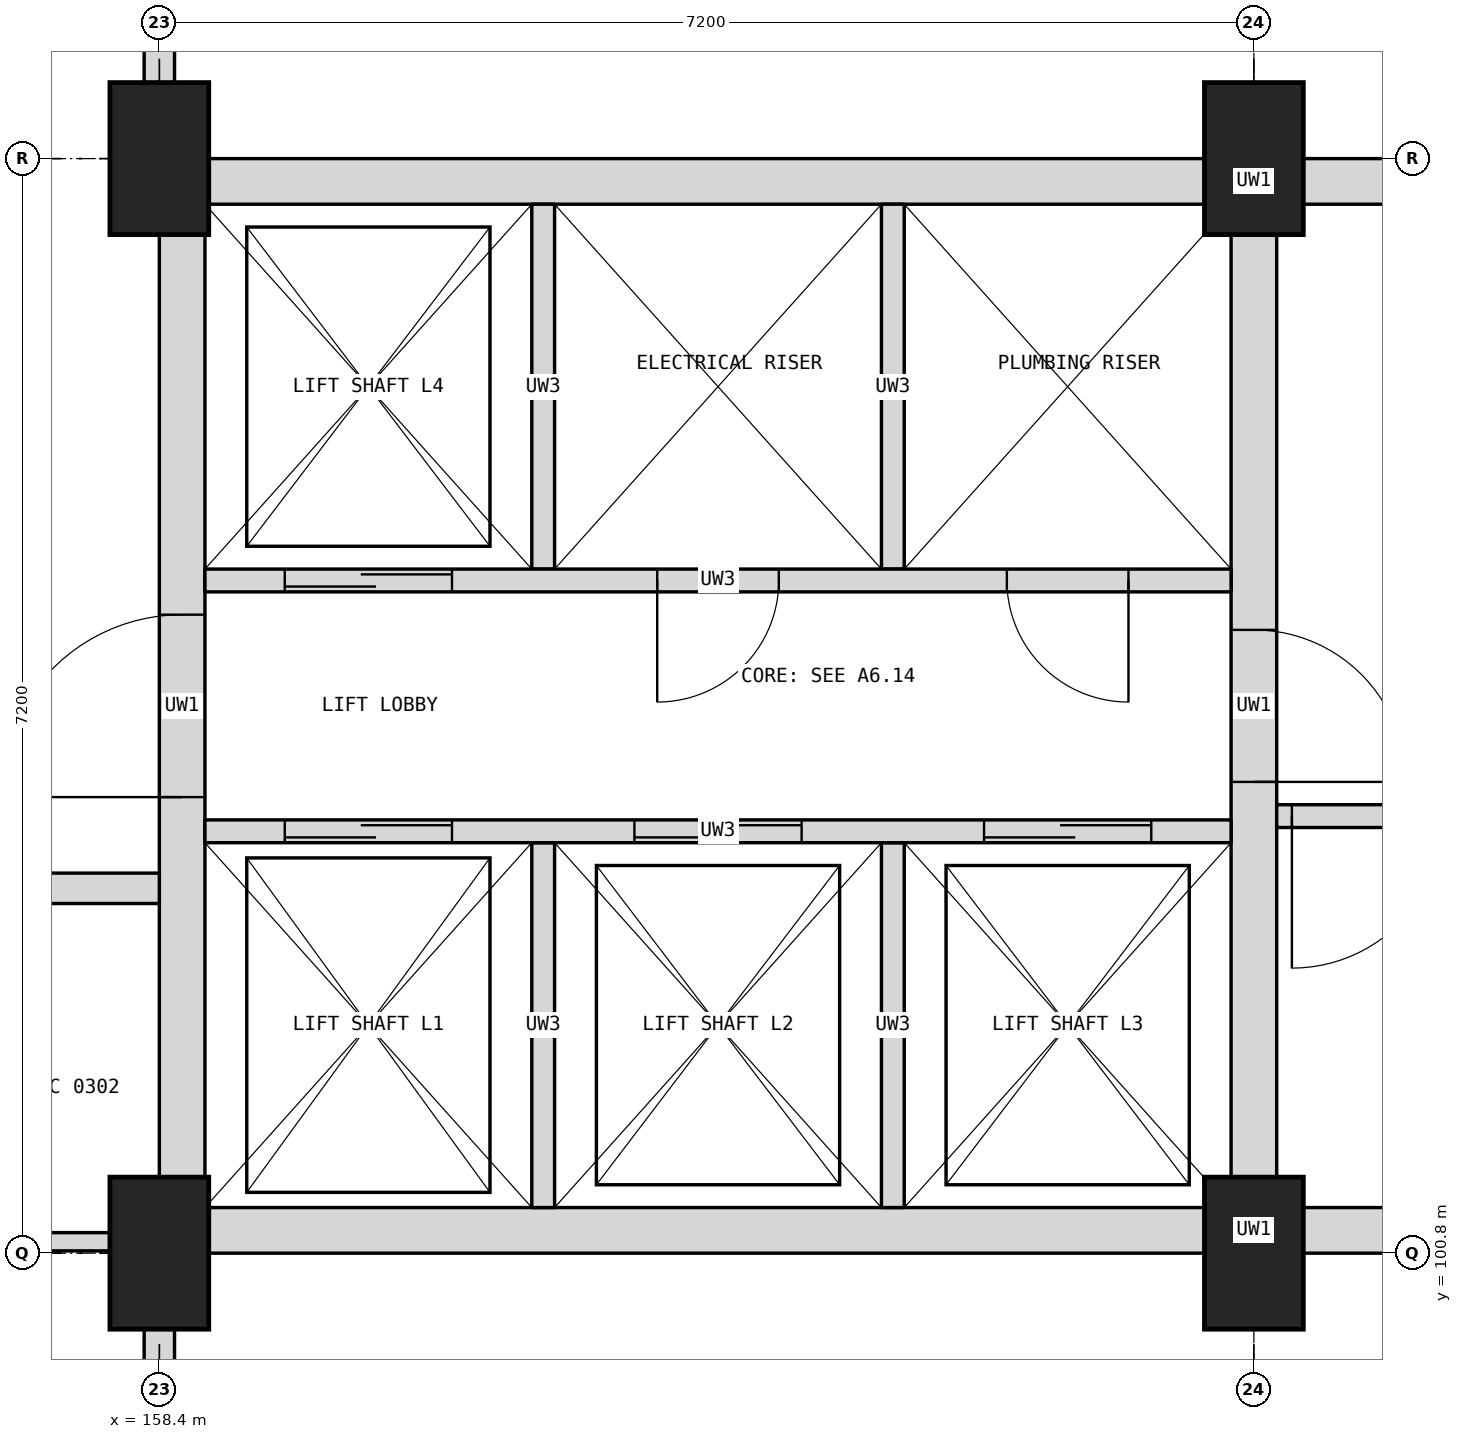
"""IFC4 building model, lengths in metres.
Left out: names, types, materials, properties, quantities, classifications, styles, units other than length and angle.
Written with IfcOpenShell. Run it as: python <this file> out.ifc"""

import sys

from ifc_helpers import new_model, si_unit, direction, frame, frame_2d, origin, origin_2d, place, context, subcontext, project, spatial, rectangle, extrude, element, fill, save


model = new_model("IFC4")
c1 = context("Model", 3, precision=1e-05, world=origin(), true_north=direction((0.0, 1.0)))
c2 = subcontext(c1, "Body", "Model", "MODEL_VIEW")
j1 = project(units=[si_unit("LENGTHUNIT", "METRE"), si_unit("PLANEANGLEUNIT", "RADIAN")], contexts=[c1])
p1 = place(None, origin())
s1 = spatial("IfcSite", under=j1, at=p1, CompositionType="ELEMENT")
p2 = place(p1, origin())
s2 = spatial("IfcBuilding", under=s1, at=p2, CompositionType="ELEMENT")
p3 = place(p2, frame((0.0, 0.0, 16.5)))
s3 = spatial("IfcBuildingStorey", under=s2, at=p3, CompositionType="ELEMENT", Elevation=16.5)
for number, where, z_axis, x_axis in (
    (1, (158.4, 100.8, 0.0), (0.0, 0.0, 1.0), (1.0, 0.0, 0.0)),
    (2, (158.4, 108.0, 0.0), (0.0, 0.0, 1.0), (1.0, 0.0, 0.0)),
    (3, (165.6, 100.8, 0.0), (0.0, 0.0, 1.0), (1.0, 0.0, 0.0)),
    (4, (165.6, 108.0, 0.0), (0.0, 0.0, 1.0), (1.0, 0.0, 0.0)),
):
    element("IfcColumn", number, at=place(p3, frame(where, z_axis=z_axis, x_axis=x_axis)), inside=s3, PredefinedType="COLUMN", context=c2, shape_type="SweptSolid", body=[
        extrude(rectangle(XDim=0.65, YDim=1.0, at=origin_2d()), origin(), (0.0, 0.0, 1.0), 3.4),
    ])
for number, where, z_axis, x_axis in (
    (5, (158.4, 100.95, 0.0), (0.0, 0.0, 1.0), (1.0, 0.0, 0.0)),
    (6, (158.4, 107.85, 0.0), (0.0, 0.0, 1.0), (1.0, 0.0, 0.0)),
):
    element("IfcWall", number, at=place(p3, frame(where, z_axis=z_axis, x_axis=x_axis)), inside=s3, PredefinedType="SHEAR", context=c2, shape_type="SweptSolid", body=[
        extrude(rectangle(XDim=14.4, YDim=0.3, at=frame_2d((7.2, 0.0))), origin(), (0.0, 0.0, 1.0), 3.4),
    ])
p4 = place(p3, frame((158.55, 101.1, 0.0), z_axis=(0.0, 0.0, 1.0), x_axis=(0.0, 1.0, 0.0)))
e7 = element("IfcWall", 7, at=p4, inside=s3, PredefinedType="SHEAR", context=c2, shape_type="SweptSolid", body=[
    extrude(rectangle(XDim=6.6, YDim=0.3, at=frame_2d((3.3, 0.0))), origin(), (0.0, 0.0, 1.0), 3.4),
])
p5 = place(p4, frame((2.7, 0.0, 0.0)))
e8 = element("IfcOpeningElement", 8, at=p5, cuts=e7, PredefinedType="OPENING", context=c2, shape_type="SweptSolid", body=[
    extrude(rectangle(XDim=1.2, YDim=2.1, at=frame_2d((0.6, 1.05))), frame((0.0, 0.16, 0.0), z_axis=(0.0, -1.0, 0.0), x_axis=(1.0, 0.0, 0.0)), (0.0, 0.0, 1.0), 0.32),
])
p6 = place(p3, frame((165.6, 101.1, 0.0), z_axis=(0.0, 0.0, 1.0), x_axis=(0.0, 1.0, 0.0)))
e9 = element("IfcWall", 9, at=p6, inside=s3, PredefinedType="SHEAR", context=c2, shape_type="SweptSolid", body=[
    extrude(rectangle(XDim=6.6, YDim=0.3, at=frame_2d((3.3, 0.0))), origin(), (0.0, 0.0, 1.0), 3.4),
])
p7 = place(p6, frame((2.8, 0.0, 0.0)))
e10 = element("IfcOpeningElement", 10, at=p7, cuts=e9, PredefinedType="OPENING", context=c2, shape_type="SweptSolid", body=[
    extrude(rectangle(XDim=1.0, YDim=2.1, at=frame_2d((0.5, 1.05))), frame((0.0, 0.16, 0.0), z_axis=(0.0, -1.0, 0.0), x_axis=(1.0, 0.0, 0.0)), (0.0, 0.0, 1.0), 0.32),
])
for number, where, z_axis, x_axis in (
    (11, (160.925, 101.1, 0.0), (0.0, 0.0, 1.0), (0.0, 1.0, 0.0)),
    (12, (163.225, 101.1, 0.0), (0.0, 0.0, 1.0), (0.0, 1.0, 0.0)),
    (13, (160.925, 105.3, 0.0), (0.0, 0.0, 1.0), (0.0, 1.0, 0.0)),
    (14, (163.225, 105.3, 0.0), (0.0, 0.0, 1.0), (0.0, 1.0, 0.0)),
):
    element("IfcWall", number, at=place(p3, frame(where, z_axis=z_axis, x_axis=x_axis)), inside=s3, PredefinedType="PARTITIONING", context=c2, shape_type="SweptSolid", body=[
        extrude(rectangle(XDim=2.4, YDim=0.15, at=frame_2d((1.2, 0.0))), origin(), (0.0, 0.0, 1.0), 3.4),
    ])
p8 = place(p3, frame((158.7, 103.575, 0.0), z_axis=(0.0, 0.0, 1.0), x_axis=(1.0, 0.0, 0.0)))
e15 = element("IfcWall", 15, at=p8, inside=s3, PredefinedType="PARTITIONING", context=c2, shape_type="SweptSolid", body=[
    extrude(rectangle(XDim=6.75, YDim=0.15, at=frame_2d((3.375, 0.0))), origin(), (0.0, 0.0, 1.0), 3.4),
])
p9 = place(p8, frame((0.525, 0.0, 0.0)))
e16 = element("IfcOpeningElement", 16, at=p9, cuts=e15, PredefinedType="OPENING", context=c2, shape_type="SweptSolid", body=[
    extrude(rectangle(XDim=1.1, YDim=2.1, at=frame_2d((0.55, 1.05))), frame((0.0, 0.085, 0.0), z_axis=(0.0, -1.0, 0.0), x_axis=(1.0, 0.0, 0.0)), (0.0, 0.0, 1.0), 0.17),
])
p10 = place(p8, frame((2.825, 0.0, 0.0)))
e17 = element("IfcOpeningElement", 17, at=p10, cuts=e15, PredefinedType="OPENING", context=c2, shape_type="SweptSolid", body=[
    extrude(rectangle(XDim=1.1, YDim=2.1, at=frame_2d((0.55, 1.05))), frame((0.0, 0.085, 0.0), z_axis=(0.0, -1.0, 0.0), x_axis=(1.0, 0.0, 0.0)), (0.0, 0.0, 1.0), 0.17),
])
p11 = place(p8, frame((5.125, 0.0, 0.0)))
e18 = element("IfcOpeningElement", 18, at=p11, cuts=e15, PredefinedType="OPENING", context=c2, shape_type="SweptSolid", body=[
    extrude(rectangle(XDim=1.1, YDim=2.1, at=frame_2d((0.55, 1.05))), frame((0.0, 0.085, 0.0), z_axis=(0.0, -1.0, 0.0), x_axis=(1.0, 0.0, 0.0)), (0.0, 0.0, 1.0), 0.17),
])
p12 = place(p3, frame((158.7, 105.225, 0.0), z_axis=(0.0, 0.0, 1.0), x_axis=(1.0, 0.0, 0.0)))
e19 = element("IfcWall", 19, at=p12, inside=s3, PredefinedType="PARTITIONING", context=c2, shape_type="SweptSolid", body=[
    extrude(rectangle(XDim=6.75, YDim=0.15, at=frame_2d((3.375, 0.0))), origin(), (0.0, 0.0, 1.0), 3.4),
])
p13 = place(p12, frame((0.525, 0.0, 0.0)))
e20 = element("IfcOpeningElement", 20, at=p13, cuts=e19, PredefinedType="OPENING", context=c2, shape_type="SweptSolid", body=[
    extrude(rectangle(XDim=1.1, YDim=2.1, at=frame_2d((0.55, 1.05))), frame((0.0, 0.085, 0.0), z_axis=(0.0, -1.0, 0.0), x_axis=(1.0, 0.0, 0.0)), (0.0, 0.0, 1.0), 0.17),
])
p14 = place(p12, frame((2.975, 0.0, 0.0)))
e21 = element("IfcOpeningElement", 21, at=p14, cuts=e19, PredefinedType="OPENING", context=c2, shape_type="SweptSolid", body=[
    extrude(rectangle(XDim=0.8, YDim=2.1, at=frame_2d((0.4, 1.05))), frame((0.0, 0.085, 0.0), z_axis=(0.0, -1.0, 0.0), x_axis=(1.0, 0.0, 0.0)), (0.0, 0.0, 1.0), 0.17),
])
p15 = place(p12, frame((5.275, 0.0, 0.0)))
e22 = element("IfcOpeningElement", 22, at=p15, cuts=e19, PredefinedType="OPENING", context=c2, shape_type="SweptSolid", body=[
    extrude(rectangle(XDim=0.8, YDim=2.1, at=frame_2d((0.4, 1.05))), frame((0.0, 0.085, 0.0), z_axis=(0.0, -1.0, 0.0), x_axis=(1.0, 0.0, 0.0)), (0.0, 0.0, 1.0), 0.17),
])
p16 = place(p3, frame((165.75, 103.675, 0.0), z_axis=(0.0, 0.0, 1.0), x_axis=(1.0, 0.0, 0.0)))
e23 = element("IfcWall", 23, at=p16, inside=s3, PredefinedType="SHEAR", context=c2, shape_type="SweptSolid", body=[
    extrude(rectangle(XDim=6.75, YDim=0.15, at=frame_2d((3.375, 0.0))), origin(), (0.0, 0.0, 1.0), 3.4),
])
p17 = place(p16, frame((0.1, 0.0, 0.0)))
e24 = element("IfcOpeningElement", 24, at=p17, cuts=e23, PredefinedType="OPENING", context=c2, shape_type="SweptSolid", body=[
    extrude(rectangle(XDim=1.0, YDim=2.1, at=frame_2d((0.5, 1.05))), frame((0.0, 0.085, 0.0), z_axis=(0.0, -1.0, 0.0), x_axis=(1.0, 0.0, 0.0)), (0.0, 0.0, 1.0), 0.17),
])
p18 = place(p3, frame((154.9, 100.875, 0.0), z_axis=(0.0, 0.0, 1.0), x_axis=(1.0, 0.0, 0.0)))
e25 = element("IfcWall", 25, at=p18, inside=s3, PredefinedType="PARTITIONING", context=c2, shape_type="SweptSolid", body=[
    extrude(rectangle(XDim=3.225, YDim=0.12, at=frame_2d((1.613, 0.0))), origin(), (0.0, 0.0, 1.0), 2.5),
])
p19 = place(p18, frame((1.325, 0.0, 0.0)))
e26 = element("IfcOpeningElement", 26, at=p19, cuts=e25, PredefinedType="OPENING", context=c2, shape_type="SweptSolid", body=[
    extrude(rectangle(XDim=0.75, YDim=2.1, at=frame_2d((0.375, 1.05))), frame((0.0, 0.07, 0.0), z_axis=(0.0, -1.0, 0.0), x_axis=(1.0, 0.0, 0.0)), (0.0, 0.0, 1.0), 0.14),
])
p20 = place(p3, frame((154.9, 103.2, 0.0), z_axis=(0.0, 0.0, 1.0), x_axis=(1.0, 0.0, 0.0)))
e27 = element("IfcWall", 27, at=p20, inside=s3, PredefinedType="PARTITIONING", context=c2, shape_type="SweptSolid", body=[
    extrude(rectangle(XDim=3.5, YDim=0.2, at=frame_2d((1.75, 0.0))), origin(), (0.0, 0.0, 1.0), 3.1),
])
p21 = place(p20, frame((1.25, 0.0, 0.0)))
e28 = element("IfcOpeningElement", 28, at=p21, cuts=e27, PredefinedType="OPENING", context=c2, shape_type="SweptSolid", body=[
    extrude(rectangle(XDim=0.9, YDim=2.1, at=frame_2d((0.45, 1.05))), frame((0.0, 0.11, 0.0), z_axis=(0.0, -1.0, 0.0), x_axis=(1.0, 0.0, 0.0)), (0.0, 0.0, 1.0), 0.22),
])
p22 = place(p3, frame((158.4, 94.0, 0.0), z_axis=(0.0, 0.0, 1.0), x_axis=(0.0, 1.0, 0.0)))
e29 = element("IfcWall", 29, at=p22, inside=s3, PredefinedType="PARTITIONING", context=c2, shape_type="SweptSolid", body=[
    extrude(rectangle(XDim=6.35, YDim=0.2, at=frame_2d((3.175, 0.0))), origin(), (0.0, 0.0, 1.0), 2.5),
])
p23 = place(p3, frame((158.4, 108.45, 0.0), z_axis=(0.0, 0.0, 1.0), x_axis=(0.0, 1.0, 0.0)))
e30 = element("IfcWall", 30, at=p23, inside=s3, PredefinedType="PARTITIONING", context=c2, shape_type="SweptSolid", body=[
    extrude(rectangle(XDim=6.35, YDim=0.2, at=frame_2d((3.175, 0.0))), origin(), (0.0, 0.0, 1.0), 2.5),
])
p24 = place(p23, frame((2.15, 0.0, 0.0)))
e31 = element("IfcOpeningElement", 31, at=p24, cuts=e30, PredefinedType="OPENING", context=c2, shape_type="SweptSolid", body=[
    extrude(rectangle(XDim=2.0, YDim=2.1, at=frame_2d((1.0, 1.05))), frame((0.0, 0.11, 0.0), z_axis=(0.0, -1.0, 0.0), x_axis=(1.0, 0.0, 0.0)), (0.0, 0.0, 1.0), 0.22),
])
p25 = place(p9, origin())
e32 = element("IfcDoor", 32, at=p25, inside=s3, OperationType="DOUBLE_DOOR_SLIDING", PredefinedType="DOOR", context=c2, shape_type="SweptSolid", body=[
    extrude(rectangle(XDim=1.1, YDim=2.1, at=frame_2d((0.55, 1.05))), frame((0.0, 0.025, 0.0), z_axis=(0.0, -1.0, 0.0), x_axis=(1.0, 0.0, 0.0)), (0.0, 0.0, 1.0), 0.05),
])
fill(e16, e32)
p26 = place(p10, origin())
e33 = element("IfcDoor", 33, at=p26, inside=s3, OperationType="DOUBLE_DOOR_SLIDING", PredefinedType="DOOR", context=c2, shape_type="SweptSolid", body=[
    extrude(rectangle(XDim=1.1, YDim=2.1, at=frame_2d((0.55, 1.05))), frame((0.0, 0.025, 0.0), z_axis=(0.0, -1.0, 0.0), x_axis=(1.0, 0.0, 0.0)), (0.0, 0.0, 1.0), 0.05),
])
fill(e17, e33)
p27 = place(p11, origin())
e34 = element("IfcDoor", 34, at=p27, inside=s3, OperationType="DOUBLE_DOOR_SLIDING", PredefinedType="DOOR", context=c2, shape_type="SweptSolid", body=[
    extrude(rectangle(XDim=1.1, YDim=2.1, at=frame_2d((0.55, 1.05))), frame((0.0, 0.025, 0.0), z_axis=(0.0, -1.0, 0.0), x_axis=(1.0, 0.0, 0.0)), (0.0, 0.0, 1.0), 0.05),
])
fill(e18, e34)
p28 = place(p13, origin())
e35 = element("IfcDoor", 35, at=p28, inside=s3, OperationType="DOUBLE_DOOR_SLIDING", PredefinedType="DOOR", context=c2, shape_type="SweptSolid", body=[
    extrude(rectangle(XDim=1.1, YDim=2.1, at=frame_2d((0.55, 1.05))), frame((0.0, 0.025, 0.0), z_axis=(0.0, -1.0, 0.0), x_axis=(1.0, 0.0, 0.0)), (0.0, 0.0, 1.0), 0.05),
])
fill(e20, e35)
p29 = place(p14, frame((0.8, 0.0, 0.0), z_axis=(0.0, 0.0, 1.0), x_axis=(-1.0, 0.0, 0.0)))
e36 = element("IfcDoor", 36, at=p29, inside=s3, OperationType="SINGLE_SWING_RIGHT", PredefinedType="DOOR", context=c2, shape_type="SweptSolid", body=[
    extrude(rectangle(XDim=0.8, YDim=2.1, at=frame_2d((0.4, 1.05))), frame((0.0, 0.025, 0.0), z_axis=(0.0, -1.0, 0.0), x_axis=(1.0, 0.0, 0.0)), (0.0, 0.0, 1.0), 0.05),
])
fill(e21, e36)
p30 = place(p15, frame((0.8, 0.0, 0.0), z_axis=(0.0, 0.0, 1.0), x_axis=(-1.0, 0.0, 0.0)))
e37 = element("IfcDoor", 37, at=p30, inside=s3, OperationType="SINGLE_SWING_LEFT", PredefinedType="DOOR", context=c2, shape_type="SweptSolid", body=[
    extrude(rectangle(XDim=0.8, YDim=2.1, at=frame_2d((0.4, 1.05))), frame((0.0, 0.025, 0.0), z_axis=(0.0, -1.0, 0.0), x_axis=(1.0, 0.0, 0.0)), (0.0, 0.0, 1.0), 0.05),
])
fill(e22, e37)
p31 = place(p5, origin())
e38 = element("IfcDoor", 38, at=p31, inside=s3, OperationType="SINGLE_SWING_LEFT", PredefinedType="DOOR", context=c2, shape_type="SweptSolid", body=[
    extrude(rectangle(XDim=1.2, YDim=2.1, at=frame_2d((0.6, 1.05))), frame((0.0, 0.025, 0.0), z_axis=(0.0, -1.0, 0.0), x_axis=(1.0, 0.0, 0.0)), (0.0, 0.0, 1.0), 0.05),
])
fill(e8, e38)
p32 = place(p7, frame((1.0, 0.0, 0.0), z_axis=(0.0, 0.0, 1.0), x_axis=(-1.0, 0.0, 0.0)))
e39 = element("IfcDoor", 39, at=p32, inside=s3, OperationType="SINGLE_SWING_RIGHT", PredefinedType="DOOR", context=c2, shape_type="SweptSolid", body=[
    extrude(rectangle(XDim=1.0, YDim=2.1, at=frame_2d((0.5, 1.05))), frame((0.0, 0.025, 0.0), z_axis=(0.0, -1.0, 0.0), x_axis=(1.0, 0.0, 0.0)), (0.0, 0.0, 1.0), 0.05),
])
fill(e10, e39)
p33 = place(p17, frame((1.0, 0.0, 0.0), z_axis=(0.0, 0.0, 1.0), x_axis=(-1.0, 0.0, 0.0)))
e40 = element("IfcDoor", 40, at=p33, inside=s3, OperationType="SINGLE_SWING_RIGHT", PredefinedType="DOOR", context=c2, shape_type="SweptSolid", body=[
    extrude(rectangle(XDim=1.0, YDim=2.1, at=frame_2d((0.5, 1.05))), frame((0.0, 0.025, 0.0), z_axis=(0.0, -1.0, 0.0), x_axis=(1.0, 0.0, 0.0)), (0.0, 0.0, 1.0), 0.05),
])
fill(e24, e40)
save(model, sys.argv[1])
